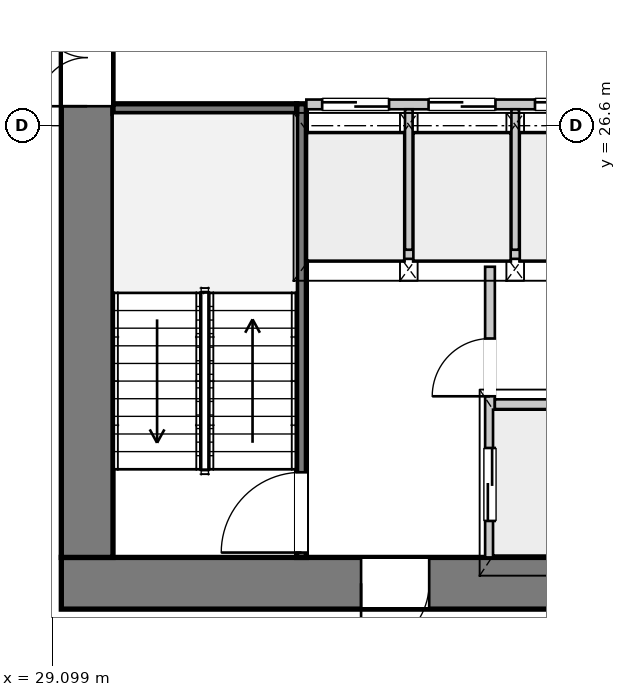
"""IFC4 building model, lengths in metres.
Left out: names, types, materials, properties, quantities, classifications, styles, units other than length and angle.
Written with IfcOpenShell. Run it as: python <this file> out.ifc"""

import sys

from ifc_helpers import new_model, si_unit, direction, frame, frame_2d, origin, place, context, subcontext, project, spatial, rectangle, extrude, source, transform, mapped, element, fill, save


model = new_model("IFC4")
c1 = context("Model", 3, precision=1e-05, world=origin(), true_north=direction((0.0, 1.0)))
c2 = subcontext(c1, "Body", "Model", "MODEL_VIEW")
j1 = project(units=[si_unit("LENGTHUNIT", "METRE"), si_unit("PLANEANGLEUNIT", "RADIAN")], contexts=[c1])
p1 = place(None, origin())
s1 = spatial("IfcSite", under=j1, at=p1, CompositionType="ELEMENT")
p2 = place(p1, origin())
s2 = spatial("IfcBuilding", under=s1, at=p2, CompositionType="ELEMENT")
p3 = place(p2, frame((0.0, 0.0, 64.8)))
s3 = spatial("IfcBuildingStorey", under=s2, at=p3, CompositionType="ELEMENT", Elevation=64.8)
p4 = place(p3, frame((46.75, 19.075, 0.0), z_axis=(0.0, 0.0, 1.0), x_axis=(-1.0, 0.0, 0.0)))
e1 = element("IfcWall", 1, at=p4, inside=s3, PredefinedType="SHEAR", context=c2, shape_type="SweptSolid", body=[
    extrude(rectangle(XDim=17.5, YDim=0.85, at=frame_2d((8.75, 0.0))), origin(), (0.0, 0.0, 1.0), 3.3),
])
p5 = place(p4, frame((4.95, 0.0, 0.0)))
e2 = element("IfcOpeningElement", 2, at=p5, cuts=e1, PredefinedType="OPENING", context=c2, shape_type="SweptSolid", body=[
    extrude(rectangle(XDim=1.12, YDim=2.25, at=frame_2d((0.56, 1.125))), frame((0.0, 0.435, 0.0), z_axis=(0.0, -1.0, 0.0), x_axis=(1.0, 0.0, 0.0)), (0.0, 0.0, 1.0), 0.87),
])
p6 = place(p4, frame((11.45, 0.0, 0.0)))
e3 = element("IfcOpeningElement", 3, at=p6, cuts=e1, PredefinedType="OPENING", context=c2, shape_type="SweptSolid", body=[
    extrude(rectangle(XDim=1.12, YDim=2.25, at=frame_2d((0.56, 1.125))), frame((0.0, 0.435, 0.0), z_axis=(0.0, -1.0, 0.0), x_axis=(1.0, 0.0, 0.0)), (0.0, 0.0, 1.0), 0.87),
])
p7 = place(p3, frame((29.675, 19.5, 0.0), z_axis=(0.0, 0.0, 1.0), x_axis=(0.0, 1.0, 0.0)))
e4 = element("IfcWall", 4, at=p7, inside=s3, PredefinedType="SHEAR", context=c2, shape_type="SweptSolid", body=[
    extrude(rectangle(XDim=14.2, YDim=0.85, at=frame_2d((7.1, 0.0))), origin(), (0.0, 0.0, 1.0), 3.3),
])
p8 = place(p7, frame((7.42, 0.0, 0.0)))
e5 = element("IfcOpeningElement", 5, at=p8, cuts=e4, PredefinedType="OPENING", context=c2, shape_type="SweptSolid", body=[
    extrude(rectangle(XDim=1.6, YDim=2.2, at=frame_2d((0.8, 1.1))), frame((0.0, 0.435, 0.0), z_axis=(0.0, -1.0, 0.0), x_axis=(1.0, 0.0, 0.0)), (0.0, 0.0, 1.0), 0.87),
])
p9 = place(p3, frame((33.2, 19.5, 0.0), z_axis=(0.0, 0.0, 1.0), x_axis=(0.0, 1.0, 0.0)))
e6 = element("IfcWall", 6, at=p9, inside=s3, PredefinedType="PARTITIONING", context=c2, shape_type="SweptSolid", body=[
    extrude(rectangle(XDim=7.46, YDim=0.16, at=frame_2d((3.73, 0.0))), origin(), (0.0, 0.0, 1.0), 3.3),
])
p10 = place(p9, frame((0.08, 0.0, 0.0)))
e7 = element("IfcOpeningElement", 7, at=p10, cuts=e6, PredefinedType="OPENING", context=c2, shape_type="SweptSolid", body=[
    extrude(rectangle(XDim=1.32, YDim=2.2, at=frame_2d((0.66, 1.1))), frame((0.0, 0.09, 0.0), z_axis=(0.0, -1.0, 0.0), x_axis=(1.0, 0.0, 0.0)), (0.0, 0.0, 1.0), 0.18),
])
p11 = place(p3, frame((30.1, 26.88, 0.0), z_axis=(0.0, 0.0, 1.0), x_axis=(1.0, 0.0, 0.0)))
e8 = element("IfcWall", 8, at=p11, inside=s3, PredefinedType="PARTITIONING", context=c2, shape_type="SweptSolid", body=[
    extrude(rectangle(XDim=3.02, YDim=0.16, at=frame_2d((1.51, 0.0))), origin(), (0.0, 0.0, 1.0), 3.3),
])
p12 = place(p3, frame((36.3, 19.5, 0.0), z_axis=(0.0, 0.0, 1.0), x_axis=(0.0, 1.0, 0.0)))
e9 = element("IfcWall", 9, at=p12, inside=s3, PredefinedType="PARTITIONING", context=c2, shape_type="SweptSolid", body=[
    extrude(rectangle(XDim=4.78, YDim=0.16, at=frame_2d((2.39, 0.0))), origin(), (0.0, 0.0, 1.0), 3.3),
])
p13 = place(p12, frame((0.6, 0.0, 0.0)))
e10 = element("IfcOpeningElement", 10, at=p13, cuts=e9, PredefinedType="OPENING", context=c2, shape_type="SweptSolid", body=[
    extrude(rectangle(XDim=1.2, YDim=2.2, at=frame_2d((0.6, 1.1))), frame((0.0, 0.09, 0.0), z_axis=(0.0, -1.0, 0.0), x_axis=(1.0, 0.0, 0.0)), (0.0, 0.0, 1.0), 0.18),
])
p14 = place(p12, frame((2.65, 0.0, 0.0)))
e11 = element("IfcOpeningElement", 11, at=p14, cuts=e9, PredefinedType="OPENING", context=c2, shape_type="SweptSolid", body=[
    extrude(rectangle(XDim=0.95, YDim=2.1, at=frame_2d((0.475, 1.05))), frame((0.0, 0.09, 0.0), z_axis=(0.0, -1.0, 0.0), x_axis=(1.0, 0.0, 0.0)), (0.0, 0.0, 1.0), 0.18),
])
p15 = place(p3, frame((36.38, 22.02, 0.0), z_axis=(0.0, 0.0, 1.0), x_axis=(1.0, 0.0, 0.0)))
e12 = element("IfcWall", 12, at=p15, inside=s3, PredefinedType="PARTITIONING", context=c2, shape_type="SweptSolid", body=[
    extrude(rectangle(XDim=3.24, YDim=0.16, at=frame_2d((1.62, 0.0))), origin(), (0.0, 0.0, 1.0), 3.3),
])
p16 = place(p3, frame((33.28, 24.49, 0.0), z_axis=(0.0, 0.0, 1.0), x_axis=(1.0, 0.0, 0.0)))
e13 = element("IfcWall", 13, at=p16, inside=s3, PredefinedType="PARTITIONING", context=c2, shape_type="SweptSolid", body=[
    extrude(rectangle(XDim=9.44, YDim=0.16, at=frame_2d((4.72, 0.0))), origin(), (0.0, 0.0, 1.0), 3.3),
])
p17 = place(p3, frame((33.28, 26.95, 0.0), z_axis=(0.0, 0.0, 1.0), x_axis=(1.0, 0.0, 0.0)))
e14 = element("IfcWall", 14, at=p17, inside=s3, PredefinedType="PARTITIONING", context=c2, shape_type="SweptSolid", body=[
    extrude(rectangle(XDim=9.44, YDim=0.16, at=frame_2d((4.72, 0.0))), origin(), (0.0, 0.0, 1.0), 3.3),
])
p18 = place(p17, frame((0.26, 0.0, 0.0)))
e15 = element("IfcOpeningElement", 15, at=p18, cuts=e14, PredefinedType="OPENING", context=c2, shape_type="SweptSolid", body=[
    extrude(rectangle(XDim=1.1, YDim=2.2, at=frame_2d((0.55, 1.1))), frame((0.0, 0.09, 0.0), z_axis=(0.0, -1.0, 0.0), x_axis=(1.0, 0.0, 0.0)), (0.0, 0.0, 1.0), 0.18),
])
p19 = place(p17, frame((2.01, 0.0, 0.0)))
e16 = element("IfcOpeningElement", 16, at=p19, cuts=e14, PredefinedType="OPENING", context=c2, shape_type="SweptSolid", body=[
    extrude(rectangle(XDim=1.1, YDim=2.2, at=frame_2d((0.55, 1.1))), frame((0.0, 0.09, 0.0), z_axis=(0.0, -1.0, 0.0), x_axis=(1.0, 0.0, 0.0)), (0.0, 0.0, 1.0), 0.18),
])
p20 = place(p17, frame((3.76, 0.0, 0.0)))
e17 = element("IfcOpeningElement", 17, at=p20, cuts=e14, PredefinedType="OPENING", context=c2, shape_type="SweptSolid", body=[
    extrude(rectangle(XDim=1.1, YDim=2.2, at=frame_2d((0.55, 1.1))), frame((0.0, 0.09, 0.0), z_axis=(0.0, -1.0, 0.0), x_axis=(1.0, 0.0, 0.0)), (0.0, 0.0, 1.0), 0.18),
])
p21 = place(p17, frame((5.51, 0.0, 0.0)))
e18 = element("IfcOpeningElement", 18, at=p21, cuts=e14, PredefinedType="OPENING", context=c2, shape_type="SweptSolid", body=[
    extrude(rectangle(XDim=1.1, YDim=2.2, at=frame_2d((0.55, 1.1))), frame((0.0, 0.09, 0.0), z_axis=(0.0, -1.0, 0.0), x_axis=(1.0, 0.0, 0.0)), (0.0, 0.0, 1.0), 0.18),
])
for number, where, z_axis, x_axis in (
    (19, (34.965, 24.56, 0.0), (0.0, 0.0, 1.0), (0.0, 1.0, 0.0)),
    (20, (36.715, 24.56, 0.0), (0.0, 0.0, 1.0), (0.0, 1.0, 0.0)),
):
    element("IfcWall", number, at=place(p3, frame(where, z_axis=z_axis, x_axis=x_axis)), inside=s3, PredefinedType="PARTITIONING", context=c2, shape_type="SweptSolid", body=[
        extrude(rectangle(XDim=2.31, YDim=0.125, at=frame_2d((1.155, 0.0))), origin(), (0.0, 0.0, 1.0), 3.3),
    ])
m1 = source(origin(), c2, "Body", "SweptSolid", [
    extrude(rectangle(XDim=1.12, YDim=2.25, at=frame_2d((0.56, 1.125))), frame((0.0, 0.025, 0.0), z_axis=(0.0, -1.0, 0.0), x_axis=(1.0, 0.0, 0.0)), (0.0, 0.0, 1.0), 0.05),
])
p22 = place(p6, origin())
e21 = element("IfcDoor", 21, at=p22, inside=s3, OperationType="SINGLE_SWING_RIGHT", PredefinedType="DOOR", context=c2, shape_type="MappedRepresentation", body=[
    mapped(m1, transform((0.0, 0.0, 0.0), x_axis=(1.0, 0.0, 0.0), y_axis=(0.0, 1.0, 0.0), z_axis=(0.0, 0.0, 1.0), scale=1.0)),
])
fill(e3, e21)
m2 = source(origin(), c2, "Body", "SweptSolid", [
    extrude(rectangle(XDim=1.6, YDim=2.2, at=frame_2d((0.8, 1.1))), frame((0.0, 0.025, 0.0), z_axis=(0.0, -1.0, 0.0), x_axis=(1.0, 0.0, 0.0)), (0.0, 0.0, 1.0), 0.05),
])
p23 = place(p8, origin())
e22 = element("IfcDoor", 22, at=p23, inside=s3, OperationType="DOUBLE_DOOR_SINGLE_SWING", PredefinedType="DOOR", context=c2, shape_type="MappedRepresentation", body=[
    mapped(m2, transform((0.0, 0.0, 0.0), x_axis=(1.0, 0.0, 0.0), y_axis=(0.0, 1.0, 0.0), z_axis=(0.0, 0.0, 1.0), scale=1.0)),
])
fill(e5, e22)
m3 = source(origin(), c2, "Body", "SweptSolid", [
    extrude(rectangle(XDim=1.32, YDim=2.2, at=frame_2d((0.66, 1.1))), frame((0.0, 0.025, 0.0), z_axis=(0.0, -1.0, 0.0), x_axis=(1.0, 0.0, 0.0)), (0.0, 0.0, 1.0), 0.05),
])
p24 = place(p10, origin())
e23 = element("IfcDoor", 23, at=p24, inside=s3, OperationType="SINGLE_SWING_LEFT", PredefinedType="DOOR", context=c2, shape_type="MappedRepresentation", body=[
    mapped(m3, transform((0.0, 0.0, 0.0), x_axis=(1.0, 0.0, 0.0), y_axis=(0.0, 1.0, 0.0), z_axis=(0.0, 0.0, 1.0), scale=1.0)),
])
fill(e7, e23)
m4 = source(origin(), c2, "Body", "SweptSolid", [
    extrude(rectangle(XDim=1.2, YDim=2.2, at=frame_2d((0.6, 1.1))), frame((0.0, 0.025, 0.0), z_axis=(0.0, -1.0, 0.0), x_axis=(1.0, 0.0, 0.0)), (0.0, 0.0, 1.0), 0.05),
])
p25 = place(p13, origin())
e24 = element("IfcDoor", 24, at=p25, inside=s3, OperationType="DOUBLE_DOOR_SLIDING", PredefinedType="DOOR", context=c2, shape_type="MappedRepresentation", body=[
    mapped(m4, transform((0.0, 0.0, 0.0), x_axis=(1.0, 0.0, 0.0), y_axis=(0.0, 1.0, 0.0), z_axis=(0.0, 0.0, 1.0), scale=1.0)),
])
fill(e10, e24)
m5 = source(origin(), c2, "Body", "SweptSolid", [
    extrude(rectangle(XDim=0.95, YDim=2.1, at=frame_2d((0.475, 1.05))), frame((0.0, 0.025, 0.0), z_axis=(0.0, -1.0, 0.0), x_axis=(1.0, 0.0, 0.0)), (0.0, 0.0, 1.0), 0.05),
])
p26 = place(p14, origin())
e25 = element("IfcDoor", 25, at=p26, inside=s3, OperationType="SINGLE_SWING_LEFT", PredefinedType="DOOR", context=c2, shape_type="MappedRepresentation", body=[
    mapped(m5, transform((0.0, 0.0, 0.0), x_axis=(1.0, 0.0, 0.0), y_axis=(0.0, 1.0, 0.0), z_axis=(0.0, 0.0, 1.0), scale=1.0)),
])
fill(e11, e25)
m6 = source(origin(), c2, "Body", "SweptSolid", [
    extrude(rectangle(XDim=1.1, YDim=2.2, at=frame_2d((0.55, 1.1))), frame((0.0, 0.025, 0.0), z_axis=(0.0, -1.0, 0.0), x_axis=(1.0, 0.0, 0.0)), (0.0, 0.0, 1.0), 0.05),
])
p27 = place(p18, origin())
e26 = element("IfcDoor", 26, at=p27, inside=s3, OperationType="DOUBLE_DOOR_SLIDING", PredefinedType="DOOR", context=c2, shape_type="MappedRepresentation", body=[
    mapped(m6, transform((0.0, 0.0, 0.0), x_axis=(1.0, 0.0, 0.0), y_axis=(0.0, 1.0, 0.0), z_axis=(0.0, 0.0, 1.0), scale=1.0)),
])
fill(e15, e26)
p28 = place(p19, origin())
e27 = element("IfcDoor", 27, at=p28, inside=s3, OperationType="DOUBLE_DOOR_SLIDING", PredefinedType="DOOR", context=c2, shape_type="MappedRepresentation", body=[
    mapped(m6, transform((0.0, 0.0, 0.0), x_axis=(1.0, 0.0, 0.0), y_axis=(0.0, 1.0, 0.0), z_axis=(0.0, 0.0, 1.0), scale=1.0)),
])
fill(e16, e27)
p29 = place(p20, origin())
e28 = element("IfcDoor", 28, at=p29, inside=s3, OperationType="DOUBLE_DOOR_SLIDING", PredefinedType="DOOR", context=c2, shape_type="MappedRepresentation", body=[
    mapped(m6, transform((0.0, 0.0, 0.0), x_axis=(1.0, 0.0, 0.0), y_axis=(0.0, 1.0, 0.0), z_axis=(0.0, 0.0, 1.0), scale=1.0)),
])
fill(e17, e28)
save(model, sys.argv[1])
